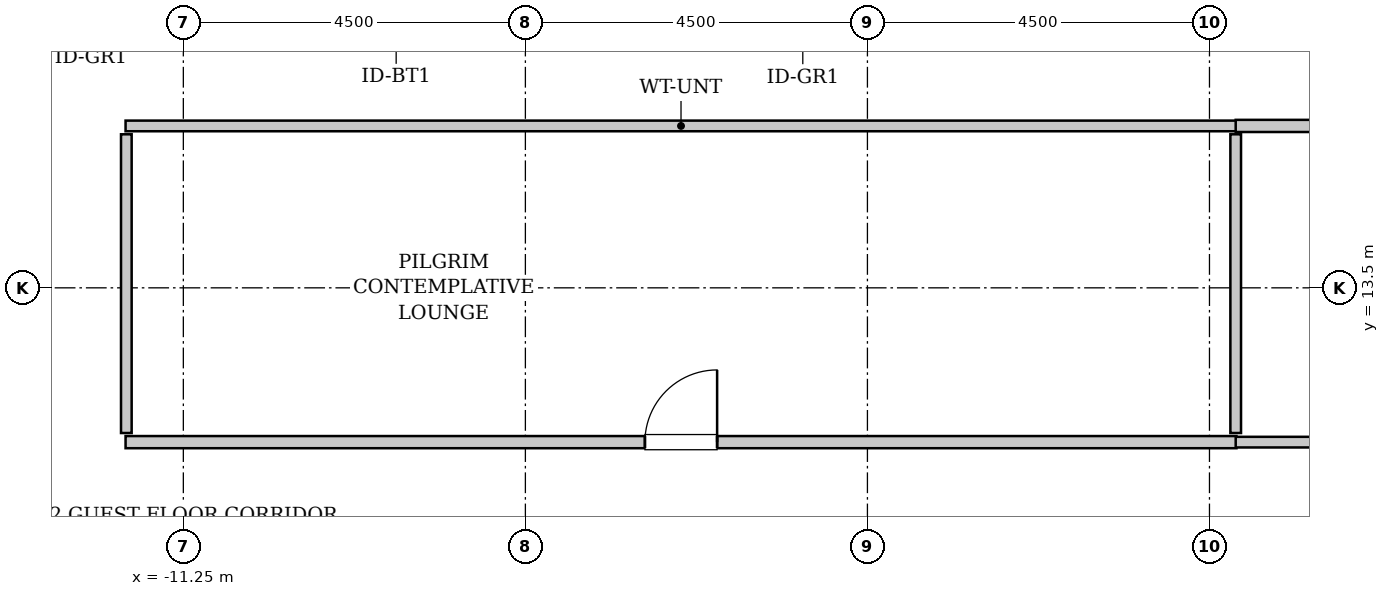
"""IFC4 building model, lengths in metres.
Left out: names, types, materials, properties, quantities, classifications, styles, units other than length and angle.
Written with IfcOpenShell. Run it as: python <this file> out.ifc"""

import sys

from ifc_helpers import new_model, si_unit, direction, frame, frame_2d, origin, place, context, subcontext, project, spatial, rectangle, extrude, source, transform, mapped, element, fill, save


model = new_model("IFC4")
c1 = context("Model", 3, precision=1e-05, world=origin(), true_north=direction((0.0, 1.0)))
c2 = subcontext(c1, "Body", "Model", "MODEL_VIEW")
j1 = project(units=[si_unit("LENGTHUNIT", "METRE"), si_unit("PLANEANGLEUNIT", "RADIAN")], contexts=[c1])
p1 = place(None, origin())
s1 = spatial("IfcSite", under=j1, at=p1, CompositionType="ELEMENT")
p2 = place(p1, origin())
s2 = spatial("IfcBuilding", under=s1, at=p2, CompositionType="ELEMENT")
p3 = place(p2, frame((0.0, 0.0, 210.4)))
s3 = spatial("IfcBuildingStorey", under=s2, at=p3, CompositionType="ELEMENT", Elevation=210.4)
m1 = source(origin(), c2, "Body", "SweptSolid", [
    extrude(rectangle(XDim=14.615, YDim=0.16, at=frame_2d((7.308, 0.0))), origin(), (0.0, 0.0, 1.0), 3.535),
])
p4 = place(p3, frame((-12.01, 11.47, 0.0), z_axis=(0.0, 0.0, 1.0), x_axis=(1.0, 0.0, 0.0)))
e1 = element("IfcWall", 1, at=p4, inside=s3, PredefinedType="PARTITIONING", context=c2, shape_type="MappedRepresentation", body=[
    mapped(m1, transform((0.0, 0.0, 0.0), x_axis=(1.0, 0.0, 0.0), y_axis=(0.0, 1.0, 0.0), z_axis=(0.0, 0.0, 1.0), scale=1.0)),
])
p5 = place(p4, frame((6.833, 0.0, 0.0)))
e2 = element("IfcOpeningElement", 2, at=p5, cuts=e1, PredefinedType="OPENING", context=c2, shape_type="SweptSolid", body=[
    extrude(rectangle(XDim=0.95, YDim=2.1, at=frame_2d((0.475, 1.05))), frame((0.0, 0.09, 0.0), z_axis=(0.0, -1.0, 0.0), x_axis=(1.0, 0.0, 0.0)), (0.0, 0.0, 1.0), 0.18),
])
m2 = source(origin(), c2, "Body", "SweptSolid", [
    extrude(rectangle(XDim=14.615, YDim=0.14, at=frame_2d((7.308, 0.0))), origin(), (0.0, 0.0, 1.0), 3.535),
])
p6 = place(p3, frame((-12.01, 15.63, 0.0), z_axis=(0.0, 0.0, 1.0), x_axis=(1.0, 0.0, 0.0)))
e3 = element("IfcWall", 3, at=p6, inside=s3, PredefinedType="PARTITIONING", context=c2, shape_type="MappedRepresentation", body=[
    mapped(m2, transform((0.0, 0.0, 0.0), x_axis=(1.0, 0.0, 0.0), y_axis=(0.0, 1.0, 0.0), z_axis=(0.0, 0.0, 1.0), scale=1.0)),
])
m3 = source(origin(), c2, "Body", "SweptSolid", [
    extrude(rectangle(XDim=3.93, YDim=0.14, at=frame_2d((1.965, 0.0))), origin(), (0.0, 0.0, 1.0), 3.535),
])
for number, where, z_axis, x_axis in (
    (4, (-12.0, 11.59, 0.0), (0.0, 0.0, 1.0), (0.0, 1.0, 0.0)),
    (5, (2.595, 11.59, 0.0), (0.0, 0.0, 1.0), (0.0, 1.0, 0.0)),
):
    element("IfcWall", number, at=place(p3, frame(where, z_axis=z_axis, x_axis=x_axis)), inside=s3, PredefinedType="PARTITIONING", context=c2, shape_type="MappedRepresentation", body=[
        mapped(m3, transform((0.0, 0.0, 0.0), x_axis=(1.0, 0.0, 0.0), y_axis=(0.0, 1.0, 0.0), z_axis=(0.0, 0.0, 1.0), scale=1.0)),
    ])
m4 = source(origin(), c2, "Body", "SweptSolid", [
    extrude(rectangle(XDim=5.61, YDim=0.16, at=frame_2d((2.805, 0.0))), origin(), (0.0, 0.0, 1.0), 3.535),
])
p7 = place(p3, frame((2.595, 15.63, 0.0), z_axis=(0.0, 0.0, 1.0), x_axis=(1.0, 0.0, 0.0)))
e6 = element("IfcWall", 6, at=p7, inside=s3, PredefinedType="PARTITIONING", context=c2, shape_type="MappedRepresentation", body=[
    mapped(m4, transform((0.0, 0.0, 0.0), x_axis=(1.0, 0.0, 0.0), y_axis=(0.0, 1.0, 0.0), z_axis=(0.0, 0.0, 1.0), scale=1.0)),
])
p8 = place(p7, frame((2.33, 0.0, 0.0)))
e7 = element("IfcOpeningElement", 7, at=p8, cuts=e6, PredefinedType="OPENING", context=c2, shape_type="SweptSolid", body=[
    extrude(rectangle(XDim=0.95, YDim=2.1, at=frame_2d((0.475, 1.05))), frame((0.0, 0.09, 0.0), z_axis=(0.0, -1.0, 0.0), x_axis=(1.0, 0.0, 0.0)), (0.0, 0.0, 1.0), 0.18),
])
m5 = source(origin(), c2, "Body", "SweptSolid", [
    extrude(rectangle(XDim=5.61, YDim=0.14, at=frame_2d((2.805, 0.0))), origin(), (0.0, 0.0, 1.0), 3.535),
])
p9 = place(p3, frame((2.595, 11.47, 0.0), z_axis=(0.0, 0.0, 1.0), x_axis=(1.0, 0.0, 0.0)))
e8 = element("IfcWall", 8, at=p9, inside=s3, PredefinedType="PARTITIONING", context=c2, shape_type="MappedRepresentation", body=[
    mapped(m5, transform((0.0, 0.0, 0.0), x_axis=(1.0, 0.0, 0.0), y_axis=(0.0, 1.0, 0.0), z_axis=(0.0, 0.0, 1.0), scale=1.0)),
])
m6 = source(origin(), c2, "Body", "SweptSolid", [
    extrude(rectangle(XDim=0.95, YDim=2.1, at=frame_2d((0.475, 1.05))), frame((0.0, 0.025, 0.0), z_axis=(0.0, -1.0, 0.0), x_axis=(1.0, 0.0, 0.0)), (0.0, 0.0, 1.0), 0.05),
])
p10 = place(p5, origin())
e9 = element("IfcDoor", 9, at=p10, inside=s3, OperationType="SINGLE_SWING_RIGHT", PredefinedType="DOOR", context=c2, shape_type="MappedRepresentation", body=[
    mapped(m6, transform((0.0, 0.0, 0.0), x_axis=(1.0, 0.0, 0.0), y_axis=(0.0, 1.0, 0.0), z_axis=(0.0, 0.0, 1.0), scale=1.0)),
])
fill(e2, e9)
save(model, sys.argv[1])
